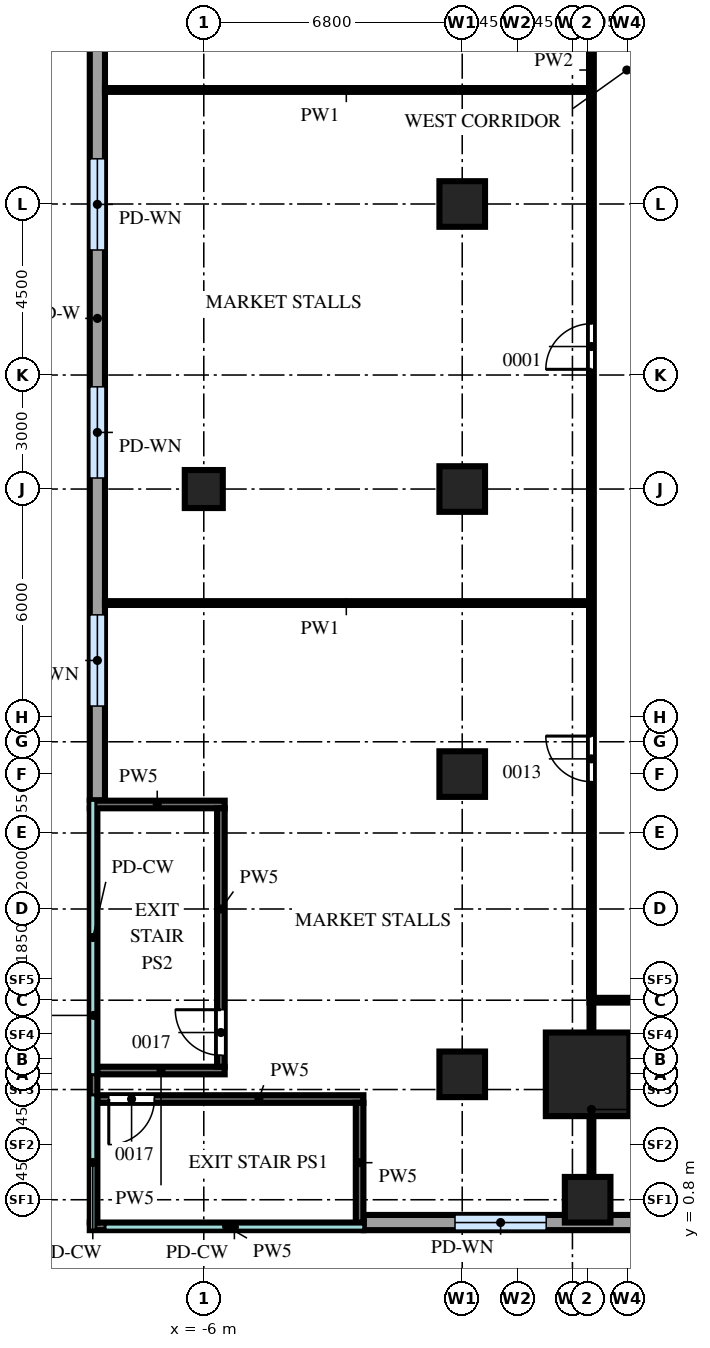
"""IFC4 building model, lengths in metres.
Left out: names, types, materials, properties, quantities, classifications, styles, units other than length and angle.
Written with IfcOpenShell. Run it as: python <this file> out.ifc"""

import sys

from ifc_helpers import new_model, si_unit, direction, frame, frame_2d, origin, origin_2d, place, context, subcontext, project, spatial, rectangle, extrude, source, transform, mapped, element, fill, save


model = new_model("IFC4")
c1 = context("Model", 3, precision=1e-05, world=origin(), true_north=direction((0.0, 1.0)))
c2 = subcontext(c1, "Body", "Model", "MODEL_VIEW")
j1 = project(units=[si_unit("LENGTHUNIT", "METRE"), si_unit("PLANEANGLEUNIT", "RADIAN")], contexts=[c1])
p1 = place(None, origin())
s1 = spatial("IfcSite", under=j1, at=p1, CompositionType="ELEMENT")
p2 = place(p1, origin())
s2 = spatial("IfcBuilding", under=s1, at=p2, CompositionType="ELEMENT")
p3 = place(p2, frame((0.0, 0.0, 7.5)))
s3 = spatial("IfcBuildingStorey", under=s2, at=p3, CompositionType="ELEMENT", Elevation=7.5)
m1 = source(origin(), c2, "Body", "SweptSolid", [
    extrude(rectangle(XDim=2.2, YDim=2.2, at=origin_2d()), origin(), (0.0, 0.0, 1.0), 5.2),
])
p4 = place(p3, frame((4.1, 4.1, 0.0), z_axis=(0.0, 0.0, 1.0), x_axis=(1.0, 0.0, 0.0)))
e1 = element("IfcColumn", 1, at=p4, inside=s3, PredefinedType="COLUMN", context=c2, shape_type="MappedRepresentation", body=[
    mapped(m1, transform((0.0, 0.0, 0.0))),
])
m2 = source(origin(), c2, "Body", "SweptSolid", [
    extrude(rectangle(XDim=1.2, YDim=1.2, at=origin_2d()), origin(), (0.0, 0.0, 1.0), 5.2),
])
for number, where, z_axis, x_axis in (
    (2, (4.1, 0.8, 0.0), (0.0, 0.0, 1.0), (1.0, 0.0, 0.0)),
    (3, (0.8, 4.1, 0.0), (0.0, 0.0, 1.0), (1.0, 0.0, 0.0)),
    (4, (0.8, 12.0, 0.0), (0.0, 0.0, 1.0), (1.0, 0.0, 0.0)),
    (5, (0.8, 19.5, 0.0), (0.0, 0.0, 1.0), (1.0, 0.0, 0.0)),
    (6, (0.8, 27.0, 0.0), (0.0, 0.0, 1.0), (1.0, 0.0, 0.0)),
):
    element("IfcColumn", number, at=place(p3, frame(where, z_axis=z_axis, x_axis=x_axis)), inside=s3, PredefinedType="COLUMN", context=c2, shape_type="MappedRepresentation", body=[
        mapped(m2, transform((0.0, 0.0, 0.0))),
    ])
m3 = source(origin(), c2, "Body", "SweptSolid", [
    extrude(rectangle(XDim=1.0, YDim=1.0, at=origin_2d()), origin(), (0.0, 0.0, 1.0), 5.2),
])
p5 = place(p3, frame((-6.0, 19.5, 0.0), z_axis=(0.0, 0.0, 1.0), x_axis=(1.0, 0.0, 0.0)))
e7 = element("IfcColumn", 7, at=p5, inside=s3, PredefinedType="COLUMN", context=c2, shape_type="MappedRepresentation", body=[
    mapped(m3, transform((0.0, 0.0, 0.0))),
])
m4 = source(origin(), c2, "Body", "SweptSolid", [
    extrude(rectangle(XDim=31.38, YDim=0.4, at=frame_2d((15.69, 0.0))), origin(), (0.0, 0.0, 1.0), 5.2),
])
p6 = place(p3, frame((-8.8, 42.69, 0.0), z_axis=(0.0, 0.0, 1.0), x_axis=(0.0, -1.0, 0.0)))
e8 = element("IfcWall", 8, at=p6, inside=s3, PredefinedType="SOLIDWALL", context=c2, shape_type="MappedRepresentation", body=[
    mapped(m4, transform((0.0, 0.0, 0.0))),
])
m5 = source(origin(), c2, "Body", "SweptSolid", [
    extrude(rectangle(XDim=2.4, YDim=2.4, at=frame_2d((1.2, 1.2))), frame((0.0, 0.21, 0.0), z_axis=(0.0, -1.0, 0.0), x_axis=(1.0, 0.0, 0.0)), (0.0, 0.0, 1.0), 0.42),
])
p7 = place(p6, frame((2.5, 0.0, 1.0)))
e9 = element("IfcOpeningElement", 9, at=p7, cuts=e8, PredefinedType="OPENING", context=c2, shape_type="MappedRepresentation", body=[
    mapped(m5, transform((0.0, 0.0, 0.0))),
])
p8 = place(p6, frame((8.5, 0.0, 1.0)))
e10 = element("IfcOpeningElement", 10, at=p8, cuts=e8, PredefinedType="OPENING", context=c2, shape_type="MappedRepresentation", body=[
    mapped(m5, transform((0.0, 0.0, 0.0))),
])
p9 = place(p6, frame((14.5, 0.0, 1.0)))
e11 = element("IfcOpeningElement", 11, at=p9, cuts=e8, PredefinedType="OPENING", context=c2, shape_type="MappedRepresentation", body=[
    mapped(m5, transform((0.0, 0.0, 0.0))),
])
p10 = place(p6, frame((20.5, 0.0, 1.0)))
e12 = element("IfcOpeningElement", 12, at=p10, cuts=e8, PredefinedType="OPENING", context=c2, shape_type="MappedRepresentation", body=[
    mapped(m5, transform((0.0, 0.0, 0.0))),
])
p11 = place(p6, frame((26.5, 0.0, 1.0)))
e13 = element("IfcOpeningElement", 13, at=p11, cuts=e8, PredefinedType="OPENING", context=c2, shape_type="MappedRepresentation", body=[
    mapped(m5, transform((0.0, 0.0, 0.0))),
])
m6 = source(origin(), c2, "Body", "SweptSolid", [
    extrude(rectangle(XDim=31.24, YDim=0.4, at=frame_2d((15.62, 0.0))), origin(), (0.0, 0.0, 1.0), 5.2),
])
p12 = place(p3, frame((-1.79, 0.2, 0.0), z_axis=(0.0, 0.0, 1.0), x_axis=(1.0, 0.0, 0.0)))
e14 = element("IfcWall", 14, at=p12, inside=s3, PredefinedType="SOLIDWALL", context=c2, shape_type="MappedRepresentation", body=[
    mapped(m6, transform((0.0, 0.0, 0.0))),
])
p13 = place(p12, frame((2.4, 0.0, 1.0)))
e15 = element("IfcOpeningElement", 15, at=p13, cuts=e14, PredefinedType="OPENING", context=c2, shape_type="MappedRepresentation", body=[
    mapped(m5, transform((0.0, 0.0, 0.0))),
])
p14 = place(p12, frame((8.4, 0.0, 1.0)))
e16 = element("IfcOpeningElement", 16, at=p14, cuts=e14, PredefinedType="OPENING", context=c2, shape_type="MappedRepresentation", body=[
    mapped(m5, transform((0.0, 0.0, 0.0))),
])
m7 = source(origin(), c2, "Body", "SweptSolid", [
    extrude(rectangle(XDim=7.2, YDim=0.2, at=frame_2d((3.6, 0.0))), origin(), (0.0, 0.0, 1.0), 5.2),
])
p15 = place(p3, frame((-9.0, 0.1, 0.0), z_axis=(0.0, 0.0, 1.0), x_axis=(1.0, 0.0, 0.0)))
e17 = element("IfcWall", 17, at=p15, inside=s3, PredefinedType="PARTITIONING", context=c2, shape_type="MappedRepresentation", body=[
    mapped(m7, transform((0.0, 0.0, 0.0))),
])
m8 = source(origin(), c2, "Body", "SweptSolid", [
    extrude(rectangle(XDim=7.0, YDim=0.2, at=frame_2d((3.5, 0.0))), origin(), (0.0, 0.0, 1.0), 5.2),
])
p16 = place(p3, frame((-8.8, 3.45, 0.0), z_axis=(0.0, 0.0, 1.0), x_axis=(1.0, 0.0, 0.0)))
e18 = element("IfcWall", 18, at=p16, inside=s3, PredefinedType="PARTITIONING", context=c2, shape_type="MappedRepresentation", body=[
    mapped(m8, transform((0.0, 0.0, 0.0))),
])
m9 = source(origin(), c2, "Body", "SweptSolid", [
    extrude(rectangle(XDim=1.2, YDim=2.1, at=frame_2d((0.6, 1.05))), frame((0.0, 0.11, 0.0), z_axis=(0.0, -1.0, 0.0), x_axis=(1.0, 0.0, 0.0)), (0.0, 0.0, 1.0), 0.22),
])
p17 = place(p16, frame((0.3, 0.0, 0.0)))
e19 = element("IfcOpeningElement", 19, at=p17, cuts=e18, PredefinedType="OPENING", context=c2, shape_type="MappedRepresentation", body=[
    mapped(m9, transform((0.0, 0.0, 0.0))),
])
m10 = source(origin(), c2, "Body", "SweptSolid", [
    extrude(rectangle(XDim=10.9, YDim=0.2, at=frame_2d((5.45, 0.0))), origin(), (0.0, 0.0, 1.0), 5.2),
])
p18 = place(p3, frame((-8.9, 0.2, 0.0), z_axis=(0.0, 0.0, 1.0), x_axis=(0.0, 1.0, 0.0)))
e20 = element("IfcWall", 20, at=p18, inside=s3, PredefinedType="PARTITIONING", context=c2, shape_type="MappedRepresentation", body=[
    mapped(m10, transform((0.0, 0.0, 0.0))),
])
m11 = source(origin(), c2, "Body", "SweptSolid", [
    extrude(rectangle(XDim=3.15, YDim=0.2, at=frame_2d((1.575, 0.0))), origin(), (0.0, 0.0, 1.0), 5.2),
])
p19 = place(p3, frame((-1.9, 0.2, 0.0), z_axis=(0.0, 0.0, 1.0), x_axis=(0.0, 1.0, 0.0)))
e21 = element("IfcWall", 21, at=p19, inside=s3, PredefinedType="PARTITIONING", context=c2, shape_type="MappedRepresentation", body=[
    mapped(m11, transform((0.0, 0.0, 0.0))),
])
m12 = source(origin(), c2, "Body", "SweptSolid", [
    extrude(rectangle(XDim=3.35, YDim=0.2, at=frame_2d((1.675, 0.0))), origin(), (0.0, 0.0, 1.0), 5.2),
])
p20 = place(p3, frame((-8.8, 4.2, 0.0), z_axis=(0.0, 0.0, 1.0), x_axis=(1.0, 0.0, 0.0)))
e22 = element("IfcWall", 22, at=p20, inside=s3, PredefinedType="PARTITIONING", context=c2, shape_type="MappedRepresentation", body=[
    mapped(m12, transform((0.0, 0.0, 0.0))),
])
m13 = source(origin(), c2, "Body", "SweptSolid", [
    extrude(rectangle(XDim=3.55, YDim=0.2, at=frame_2d((1.775, 0.0))), origin(), (0.0, 0.0, 1.0), 5.2),
])
p21 = place(p3, frame((-9.0, 11.2, 0.0), z_axis=(0.0, 0.0, 1.0), x_axis=(1.0, 0.0, 0.0)))
e23 = element("IfcWall", 23, at=p21, inside=s3, PredefinedType="PARTITIONING", context=c2, shape_type="MappedRepresentation", body=[
    mapped(m13, transform((0.0, 0.0, 0.0))),
])
m14 = source(origin(), c2, "Body", "SweptSolid", [
    extrude(rectangle(XDim=6.8, YDim=0.2, at=frame_2d((3.4, 0.0))), origin(), (0.0, 0.0, 1.0), 5.2),
])
p22 = place(p3, frame((-5.55, 4.3, 0.0), z_axis=(0.0, 0.0, 1.0), x_axis=(0.0, 1.0, 0.0)))
e24 = element("IfcWall", 24, at=p22, inside=s3, PredefinedType="PARTITIONING", context=c2, shape_type="MappedRepresentation", body=[
    mapped(m14, transform((0.0, 0.0, 0.0))),
])
p23 = place(p22, frame((0.3, 0.0, 0.0)))
e25 = element("IfcOpeningElement", 25, at=p23, cuts=e24, PredefinedType="OPENING", context=c2, shape_type="MappedRepresentation", body=[
    mapped(m9, transform((0.0, 0.0, 0.0))),
])
m15 = source(origin(), c2, "Body", "SweptSolid", [
    extrude(rectangle(XDim=5.55, YDim=0.1, at=frame_2d((2.775, 0.0))), origin(), (0.0, 0.0, 1.0), 5.2),
])
p24 = place(p3, frame((4.2, 0.4, 0.0), z_axis=(0.0, 0.0, 1.0), x_axis=(0.0, 1.0, 0.0)))
e26 = element("IfcWall", 26, at=p24, inside=s3, PredefinedType="PARTITIONING", context=c2, shape_type="MappedRepresentation", body=[
    mapped(m15, transform((0.0, 0.0, 0.0))),
])
m16 = source(origin(), c2, "Body", "SweptSolid", [
    extrude(rectangle(XDim=22.3, YDim=0.125, at=frame_2d((11.15, 0.0))), origin(), (0.0, 0.0, 1.0), 5.2),
])
p25 = place(p3, frame((4.15, 6.05, 0.0), z_axis=(0.0, 0.0, 1.0), x_axis=(1.0, 0.0, 0.0)))
e27 = element("IfcWall", 27, at=p25, inside=s3, PredefinedType="PARTITIONING", context=c2, shape_type="MappedRepresentation", body=[
    mapped(m16, transform((0.0, 0.0, 0.0))),
])
m17 = source(origin(), c2, "Body", "SweptSolid", [
    extrude(rectangle(XDim=1.2, YDim=2.1, at=frame_2d((0.6, 1.05))), frame((0.0, 0.073, 0.0), z_axis=(0.0, -1.0, 0.0), x_axis=(1.0, 0.0, 0.0)), (0.0, 0.0, 1.0), 0.145),
])
p26 = place(p25, frame((9.2, 0.0, 0.0)))
e28 = element("IfcOpeningElement", 28, at=p26, cuts=e27, PredefinedType="OPENING", context=c2, shape_type="MappedRepresentation", body=[
    mapped(m17, transform((0.0, 0.0, 0.0))),
])
m18 = source(origin(), c2, "Body", "SweptSolid", [
    extrude(rectangle(XDim=41.8, YDim=0.125, at=frame_2d((20.9, 0.0))), origin(), (0.0, 0.0, 1.0), 5.2),
])
p27 = place(p3, frame((4.2, 6.15, 0.0), z_axis=(0.0, 0.0, 1.0), x_axis=(0.0, 1.0, 0.0)))
e29 = element("IfcWall", 29, at=p27, inside=s3, PredefinedType="PARTITIONING", context=c2, shape_type="MappedRepresentation", body=[
    mapped(m18, transform((0.0, 0.0, 0.0))),
])
p28 = place(p27, frame((5.65, 0.0, 0.0)))
e30 = element("IfcOpeningElement", 30, at=p28, cuts=e29, PredefinedType="OPENING", context=c2, shape_type="MappedRepresentation", body=[
    mapped(m17, transform((0.0, 0.0, 0.0))),
])
p29 = place(p27, frame((16.5, 0.0, 0.0)))
e31 = element("IfcOpeningElement", 31, at=p29, cuts=e29, PredefinedType="OPENING", context=c2, shape_type="MappedRepresentation", body=[
    mapped(m17, transform((0.0, 0.0, 0.0))),
])
p30 = place(p27, frame((31.05, 0.0, 0.0)))
e32 = element("IfcOpeningElement", 32, at=p30, cuts=e29, PredefinedType="OPENING", context=c2, shape_type="MappedRepresentation", body=[
    mapped(m17, transform((0.0, 0.0, 0.0))),
])
m19 = source(origin(), c2, "Body", "SweptSolid", [
    extrude(rectangle(XDim=12.7, YDim=0.1, at=frame_2d((6.35, 0.0))), origin(), (0.0, 0.0, 1.0), 5.2),
])
for number, where, z_axis, x_axis in (
    (33, (-8.6, 16.5, 0.0), (0.0, 0.0, 1.0), (1.0, 0.0, 0.0)),
    (34, (-8.6, 30.0, 0.0), (0.0, 0.0, 1.0), (1.0, 0.0, 0.0)),
):
    element("IfcWall", number, at=place(p3, frame(where, z_axis=z_axis, x_axis=x_axis)), inside=s3, PredefinedType="PARTITIONING", context=c2, shape_type="MappedRepresentation", body=[
        mapped(m19, transform((0.0, 0.0, 0.0))),
    ])
m20 = source(origin(), c2, "Body", "SweptSolid", [
    extrude(rectangle(XDim=2.4, YDim=2.4, at=frame_2d((1.2, 1.2))), frame((0.0, 0.03, 0.0), z_axis=(0.0, -1.0, 0.0), x_axis=(1.0, 0.0, 0.0)), (0.0, 0.0, 1.0), 0.06),
])
p31 = place(p9, origin())
e35 = element("IfcWindow", 35, at=p31, inside=s3, PartitioningType="SINGLE_PANEL", PredefinedType="WINDOW", context=c2, shape_type="MappedRepresentation", body=[
    mapped(m20, transform((0.0, 0.0, 0.0))),
])
fill(e11, e35)
p32 = place(p10, origin())
e36 = element("IfcWindow", 36, at=p32, inside=s3, PartitioningType="SINGLE_PANEL", PredefinedType="WINDOW", context=c2, shape_type="MappedRepresentation", body=[
    mapped(m20, transform((0.0, 0.0, 0.0))),
])
fill(e12, e36)
p33 = place(p11, origin())
e37 = element("IfcWindow", 37, at=p33, inside=s3, PartitioningType="SINGLE_PANEL", PredefinedType="WINDOW", context=c2, shape_type="MappedRepresentation", body=[
    mapped(m20, transform((0.0, 0.0, 0.0))),
])
fill(e13, e37)
p34 = place(p13, origin())
e38 = element("IfcWindow", 38, at=p34, inside=s3, PartitioningType="SINGLE_PANEL", PredefinedType="WINDOW", context=c2, shape_type="MappedRepresentation", body=[
    mapped(m20, transform((0.0, 0.0, 0.0))),
])
fill(e15, e38)
m21 = source(origin(), c2, "Body", "SweptSolid", [
    extrude(rectangle(XDim=1.2, YDim=2.1, at=frame_2d((0.6, 1.05))), frame((0.0, 0.025, 0.0), z_axis=(0.0, -1.0, 0.0), x_axis=(1.0, 0.0, 0.0)), (0.0, 0.0, 1.0), 0.05),
])
p35 = place(p28, origin())
e39 = element("IfcDoor", 39, at=p35, inside=s3, OperationType="SINGLE_SWING_LEFT", PredefinedType="DOOR", context=c2, shape_type="MappedRepresentation", body=[
    mapped(m21, transform((0.0, 0.0, 0.0))),
])
fill(e30, e39)
p36 = place(p29, origin())
e40 = element("IfcDoor", 40, at=p36, inside=s3, OperationType="SINGLE_SWING_RIGHT", PredefinedType="DOOR", context=c2, shape_type="MappedRepresentation", body=[
    mapped(m21, transform((0.0, 0.0, 0.0))),
])
fill(e31, e40)
p37 = place(p17, origin())
e41 = element("IfcDoor", 41, at=p37, inside=s3, OperationType="SINGLE_SWING_LEFT", PredefinedType="DOOR", context=c2, shape_type="MappedRepresentation", body=[
    mapped(m21, transform((0.0, 0.0, 0.0))),
])
fill(e19, e41)
p38 = place(p23, origin())
e42 = element("IfcDoor", 42, at=p38, inside=s3, OperationType="SINGLE_SWING_LEFT", PredefinedType="DOOR", context=c2, shape_type="MappedRepresentation", body=[
    mapped(m21, transform((0.0, 0.0, 0.0))),
])
fill(e25, e42)
save(model, sys.argv[1])
